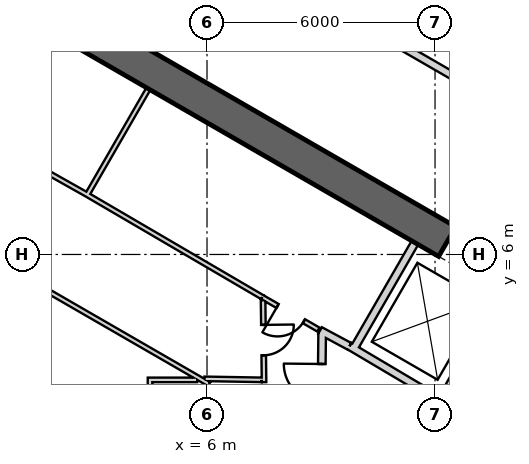
"""IFC4 building model, lengths in metres.
Left out: names, types, materials, properties, quantities, classifications, styles, units other than length and angle.
Written with IfcOpenShell. Run it as: python <this file> out.ifc"""

import sys

from ifc_helpers import new_model, si_unit, direction, frame, frame_2d, origin, place, context, subcontext, project, spatial, rectangle, extrude, element, fill, save


model = new_model("IFC4")
c1 = context("Model", 3, precision=1e-05, world=origin(), true_north=direction((0.0, 1.0)))
c2 = subcontext(c1, "Body", "Model", "MODEL_VIEW")
j1 = project(units=[si_unit("LENGTHUNIT", "METRE"), si_unit("PLANEANGLEUNIT", "RADIAN")], contexts=[c1])
p1 = place(None, origin())
s1 = spatial("IfcSite", under=j1, at=p1, CompositionType="ELEMENT")
p2 = place(p1, origin())
s2 = spatial("IfcBuilding", under=s1, at=p2, CompositionType="ELEMENT")
p3 = place(p2, frame((0.0, 0.0, 345.5)))
s3 = spatial("IfcBuildingStorey", under=s2, at=p3, CompositionType="ELEMENT", Elevation=345.5)
p4 = place(p3, frame((19.475, 2.208, 0.0), z_axis=(0.0, 0.0, 1.0), x_axis=(-0.866028369851, 0.499994862586, 0.0)))
e1 = element("IfcWall", 1, at=p4, inside=s3, PredefinedType="SHEAR", context=c2, shape_type="SweptSolid", body=[
    extrude(rectangle(XDim=31.523, YDim=0.9, at=frame_2d((15.762, 0.0))), origin(), (0.0, 0.0, 1.0), 3.9),
])
p5 = place(p4, frame((7.062, 0.0, 0.0)))
e2 = element("IfcOpeningElement", 2, at=p5, cuts=e1, PredefinedType="OPENING", context=c2, shape_type="SweptSolid", body=[
    extrude(rectangle(XDim=1.2, YDim=2.4, at=frame_2d((0.6, 1.2))), frame((0.0, 0.46, 0.0), z_axis=(0.0, -1.0, 0.0), x_axis=(1.0, 0.0, 0.0)), (0.0, 0.0, 1.0), 0.92),
])
p6 = place(p4, frame((3.612, 0.0, 0.0)))
e3 = element("IfcOpeningElement", 3, at=p6, cuts=e1, PredefinedType="OPENING", context=c2, shape_type="SweptSolid", body=[
    extrude(rectangle(XDim=1.2, YDim=2.4, at=frame_2d((0.6, 1.2))), frame((0.0, 0.46, 0.0), z_axis=(0.0, -1.0, 0.0), x_axis=(1.0, 0.0, 0.0)), (0.0, 0.0, 1.0), 0.92),
])
p7 = place(p4, frame((26.712, 0.0, 0.0)))
e4 = element("IfcOpeningElement", 4, at=p7, cuts=e1, PredefinedType="OPENING", context=c2, shape_type="SweptSolid", body=[
    extrude(rectangle(XDim=1.2, YDim=2.4, at=frame_2d((0.6, 1.2))), frame((0.0, 0.46, 0.0), z_axis=(0.0, -1.0, 0.0), x_axis=(1.0, 0.0, 0.0)), (0.0, 0.0, 1.0), 0.92),
])
p8 = place(p3, frame((9.847, 3.495, 0.0), z_axis=(0.0, 0.0, 1.0), x_axis=(0.499984717929, 0.866034226713, 0.0)))
e5 = element("IfcWall", 5, at=p8, inside=s3, PredefinedType="PLUMBINGWALL", context=c2, shape_type="SweptSolid", body=[
    extrude(rectangle(XDim=3.25, YDim=0.2, at=frame_2d((1.625, 0.0))), origin(), (0.0, 0.0, 1.0), 3.6),
])
p9 = place(p3, frame((12.11, 2.073, 0.0), z_axis=(0.0, 0.0, 1.0), x_axis=(0.49196600604, 0.870614408852, 0.0)))
e6 = element("IfcWall", 6, at=p9, inside=s3, PredefinedType="PLUMBINGWALL", context=c2, shape_type="SweptSolid", body=[
    extrude(rectangle(XDim=3.35, YDim=0.2, at=frame_2d((1.675, 0.0))), origin(), (0.0, 0.0, 1.0), 3.6),
])
p10 = place(p3, frame((12.073, 2.211, 0.0), z_axis=(0.0, 0.0, 1.0), x_axis=(-0.860414880418, 0.509594185166, 0.0)))
e7 = element("IfcWall", 7, at=p10, inside=s3, PredefinedType="PLUMBINGWALL", context=c2, shape_type="SweptSolid", body=[
    extrude(rectangle(XDim=2.7, YDim=0.2, at=frame_2d((1.35, 0.0))), origin(), (0.0, 0.0, 1.0), 3.6),
])
p11 = place(p3, frame((4.457, 10.359, 0.0), z_axis=(0.0, 0.0, 1.0), x_axis=(-0.500017246033, -0.866015446554, 0.0)))
e8 = element("IfcWall", 8, at=p11, inside=s3, PredefinedType="PARTITIONING", context=c2, shape_type="SweptSolid", body=[
    extrude(rectangle(XDim=3.25, YDim=0.12, at=frame_2d((1.625, 0.0))), origin(), (0.0, 0.0, 1.0), 3.6),
])
p12 = place(p3, frame((8.974, 3.999, 0.0), z_axis=(0.0, 0.0, 1.0), x_axis=(0.880917147855, -0.473270513147, 0.0)))
e9 = element("IfcWall", 9, at=p12, inside=s3, PredefinedType="PARTITIONING", context=c2, shape_type="SweptSolid", body=[
    extrude(rectangle(XDim=0.878, YDim=0.2, at=frame_2d((0.439, 0.0))), origin(), (0.0, 0.0, 1.0), 3.6),
])
p13 = place(p3, frame((2.821, 7.586, 0.0), z_axis=(0.0, 0.0, 1.0), x_axis=(0.863262357411, -0.504755487615, 0.0)))
e10 = element("IfcWall", 10, at=p13, inside=s3, PredefinedType="PARTITIONING", context=c2, shape_type="SweptSolid", body=[
    extrude(rectangle(XDim=5.37, YDim=0.12, at=frame_2d((2.685, 0.0))), origin(), (0.0, 0.0, 1.0), 3.6),
])
p14 = place(p3, frame((7.457, 4.875, 0.0), z_axis=(0.0, 0.0, 1.0), x_axis=(0.866027945518, -0.499995597562, 0.0)))
e11 = element("IfcWall", 11, at=p14, inside=s3, PredefinedType="PARTITIONING", context=c2, shape_type="SweptSolid", body=[
    extrude(rectangle(XDim=1.702, YDim=0.12, at=frame_2d((0.851, 0.0))), origin(), (0.0, 0.0, 1.0), 3.6),
])
p15 = place(p14, frame((0.461, 0.0, 0.0)))
e12 = element("IfcOpeningElement", 12, at=p15, cuts=e11, PredefinedType="OPENING", context=c2, shape_type="SweptSolid", body=[
    extrude(rectangle(XDim=0.8, YDim=2.1, at=frame_2d((0.4, 1.05))), frame((0.0, 0.07, 0.0), z_axis=(0.0, -1.0, 0.0), x_axis=(1.0, 0.0, 0.0)), (0.0, 0.0, 1.0), 0.14),
])
p16 = place(p3, frame((0.494, 8.896, 0.0), z_axis=(0.0, 0.0, 1.0), x_axis=(0.871426548871, -0.490526013503, 0.0)))
e13 = element("IfcWall", 13, at=p16, inside=s3, PredefinedType="PARTITIONING", context=c2, shape_type="SweptSolid", body=[
    extrude(rectangle(XDim=2.67, YDim=0.12, at=frame_2d((1.335, 0.0))), origin(), (0.0, 0.0, 1.0), 3.6),
])
p17 = place(p3, frame((9.001, 1.27, 0.0), z_axis=(0.0, 0.0, 1.0), x_axis=(0.010723968736, 0.999942496594, 0.0)))
e14 = element("IfcWall", 14, at=p17, inside=s3, PredefinedType="PARTITIONING", context=c2, shape_type="SweptSolid", body=[
    extrude(rectangle(XDim=2.709, YDim=0.2, at=frame_2d((1.354, 0.0))), origin(), (0.0, 0.0, 1.0), 3.6),
])
p18 = place(p17, frame((0.848, 0.0, 0.0)))
e15 = element("IfcOpeningElement", 15, at=p18, cuts=e14, PredefinedType="OPENING", context=c2, shape_type="SweptSolid", body=[
    extrude(rectangle(XDim=1.0, YDim=2.1, at=frame_2d((0.5, 1.05))), frame((0.0, 0.11, 0.0), z_axis=(0.0, -1.0, 0.0), x_axis=(1.0, 0.0, 0.0)), (0.0, 0.0, 1.0), 0.22),
])
p19 = place(p3, frame((-0.786, 6.538, 0.0), z_axis=(0.0, 0.0, 1.0), x_axis=(0.866034288228, -0.499984611377, 0.0)))
e16 = element("IfcWall", 16, at=p19, inside=s3, PredefinedType="PARTITIONING", context=c2, shape_type="SweptSolid", body=[
    extrude(rectangle(XDim=7.9, YDim=0.12, at=frame_2d((3.95, 0.0))), origin(), (0.0, 0.0, 1.0), 3.6),
])
p20 = place(p3, frame((4.44, 2.7, 0.0), z_axis=(0.0, 0.0, 1.0), x_axis=(1.0, 0.0, 0.0)))
e17 = element("IfcWall", 17, at=p20, inside=s3, PredefinedType="PARTITIONING", context=c2, shape_type="SweptSolid", body=[
    extrude(rectangle(XDim=1.302, YDim=0.12, at=frame_2d((0.651, 0.0))), origin(), (0.0, 0.0, 1.0), 3.6),
])
p21 = place(p3, frame((4.5, 0.94, 0.0), z_axis=(0.0, 0.0, 1.0), x_axis=(0.0, 1.0, 0.0)))
e18 = element("IfcWall", 18, at=p21, inside=s3, PredefinedType="PARTITIONING", context=c2, shape_type="SweptSolid", body=[
    extrude(rectangle(XDim=1.7, YDim=0.12, at=frame_2d((0.85, 0.0))), origin(), (0.0, 0.0, 1.0), 3.6),
])
p22 = place(p3, frame((-0.48, 2.727, 0.0), z_axis=(0.0, 0.0, 1.0), x_axis=(0.86601279846, -0.500021832428, 0.0)))
e19 = element("IfcWall", 19, at=p22, inside=s3, PredefinedType="PARTITIONING", context=c2, shape_type="SweptSolid", body=[
    extrude(rectangle(XDim=3.435, YDim=0.12, at=frame_2d((1.718, 0.0))), origin(), (0.0, 0.0, 1.0), 3.6),
])
p23 = place(p22, frame((1.37, 0.0, 0.0)))
e20 = element("IfcOpeningElement", 20, at=p23, cuts=e19, PredefinedType="OPENING", context=c2, shape_type="SweptSolid", body=[
    extrude(rectangle(XDim=0.8, YDim=2.1, at=frame_2d((0.4, 1.05))), frame((0.0, 0.07, 0.0), z_axis=(0.0, -1.0, 0.0), x_axis=(1.0, 0.0, 0.0)), (0.0, 0.0, 1.0), 0.14),
])
p24 = place(p3, frame((7.501, 2.64, 0.0), z_axis=(0.0, 0.0, 1.0), x_axis=(-0.01178388431, 0.999930567625, 0.0)))
e21 = element("IfcWall", 21, at=p24, inside=s3, PredefinedType="PARTITIONING", context=c2, shape_type="SweptSolid", body=[
    extrude(rectangle(XDim=2.155, YDim=0.12, at=frame_2d((1.077, 0.0))), origin(), (0.0, 0.0, 1.0), 3.6),
])
p25 = place(p24, frame((0.707, 0.0, 0.0)))
e22 = element("IfcOpeningElement", 22, at=p25, cuts=e21, PredefinedType="OPENING", context=c2, shape_type="SweptSolid", body=[
    extrude(rectangle(XDim=0.8, YDim=2.1, at=frame_2d((0.4, 1.05))), frame((0.0, 0.07, 0.0), z_axis=(0.0, -1.0, 0.0), x_axis=(1.0, 0.0, 0.0)), (0.0, 0.0, 1.0), 0.14),
])
p26 = place(p3, frame((5.934, 2.727, 0.0), z_axis=(0.0, 0.0, 1.0), x_axis=(0.999846739959, -0.017507044085, 0.0)))
e23 = element("IfcWall", 23, at=p26, inside=s3, PredefinedType="PARTITIONING", context=c2, shape_type="SweptSolid", body=[
    extrude(rectangle(XDim=1.506, YDim=0.12, at=frame_2d((0.753, 0.0))), origin(), (0.0, 0.0, 1.0), 3.6),
])
p27 = place(p3, frame((22.074, 5.153, 0.0), z_axis=(0.0, 0.0, 1.0), x_axis=(-0.866023485483, 0.500003322581, 0.0)))
e24 = element("IfcWall", 24, at=p27, inside=s3, PredefinedType="PARTITIONING", context=c2, shape_type="SweptSolid", body=[
    extrude(rectangle(XDim=32.881, YDim=0.2, at=frame_2d((16.44, 0.0))), origin(), (0.0, 0.0, 1.0), 2.97),
])
p28 = place(p27, frame((15.99, 0.0, 0.0)))
e25 = element("IfcOpeningElement", 25, at=p28, cuts=e24, PredefinedType="OPENING", context=c2, shape_type="SweptSolid", body=[
    extrude(rectangle(XDim=1.0, YDim=2.1, at=frame_2d((0.5, 1.05))), frame((0.0, 0.11, 0.0), z_axis=(0.0, -1.0, 0.0), x_axis=(1.0, 0.0, 0.0)), (0.0, 0.0, 1.0), 0.22),
])
p29 = place(p18, origin())
e26 = element("IfcDoor", 26, at=p29, inside=s3, OperationType="SINGLE_SWING_LEFT", PredefinedType="USERDEFINED", context=c2, shape_type="SweptSolid", body=[
    extrude(rectangle(XDim=1.0, YDim=2.1, at=frame_2d((0.5, 1.05))), frame((0.0, 0.025, 0.0), z_axis=(0.0, -1.0, 0.0), x_axis=(1.0, 0.0, 0.0)), (0.0, 0.0, 1.0), 0.05),
])
fill(e15, e26)
p30 = place(p25, origin())
e27 = element("IfcDoor", 27, at=p30, inside=s3, OperationType="SINGLE_SWING_LEFT", PredefinedType="USERDEFINED", context=c2, shape_type="SweptSolid", body=[
    extrude(rectangle(XDim=0.8, YDim=2.1, at=frame_2d((0.4, 1.05))), frame((0.0, 0.025, 0.0), z_axis=(0.0, -1.0, 0.0), x_axis=(1.0, 0.0, 0.0)), (0.0, 0.0, 1.0), 0.05),
])
fill(e22, e27)
p31 = place(p15, origin())
e28 = element("IfcDoor", 28, at=p31, inside=s3, OperationType="SINGLE_SWING_RIGHT", PredefinedType="USERDEFINED", context=c2, shape_type="SweptSolid", body=[
    extrude(rectangle(XDim=0.8, YDim=2.1, at=frame_2d((0.4, 1.05))), frame((0.0, 0.025, 0.0), z_axis=(0.0, -1.0, 0.0), x_axis=(1.0, 0.0, 0.0)), (0.0, 0.0, 1.0), 0.05),
])
fill(e12, e28)
p32 = place(p5, origin())
e29 = element("IfcDoor", 29, at=p32, inside=s3, OperationType="SLIDING_TO_LEFT", PredefinedType="USERDEFINED", context=c2, shape_type="SweptSolid", body=[
    extrude(rectangle(XDim=1.2, YDim=2.4, at=frame_2d((0.6, 1.2))), frame((0.0, 0.025, 0.0), z_axis=(0.0, -1.0, 0.0), x_axis=(1.0, 0.0, 0.0)), (0.0, 0.0, 1.0), 0.05),
])
fill(e2, e29)
save(model, sys.argv[1])
